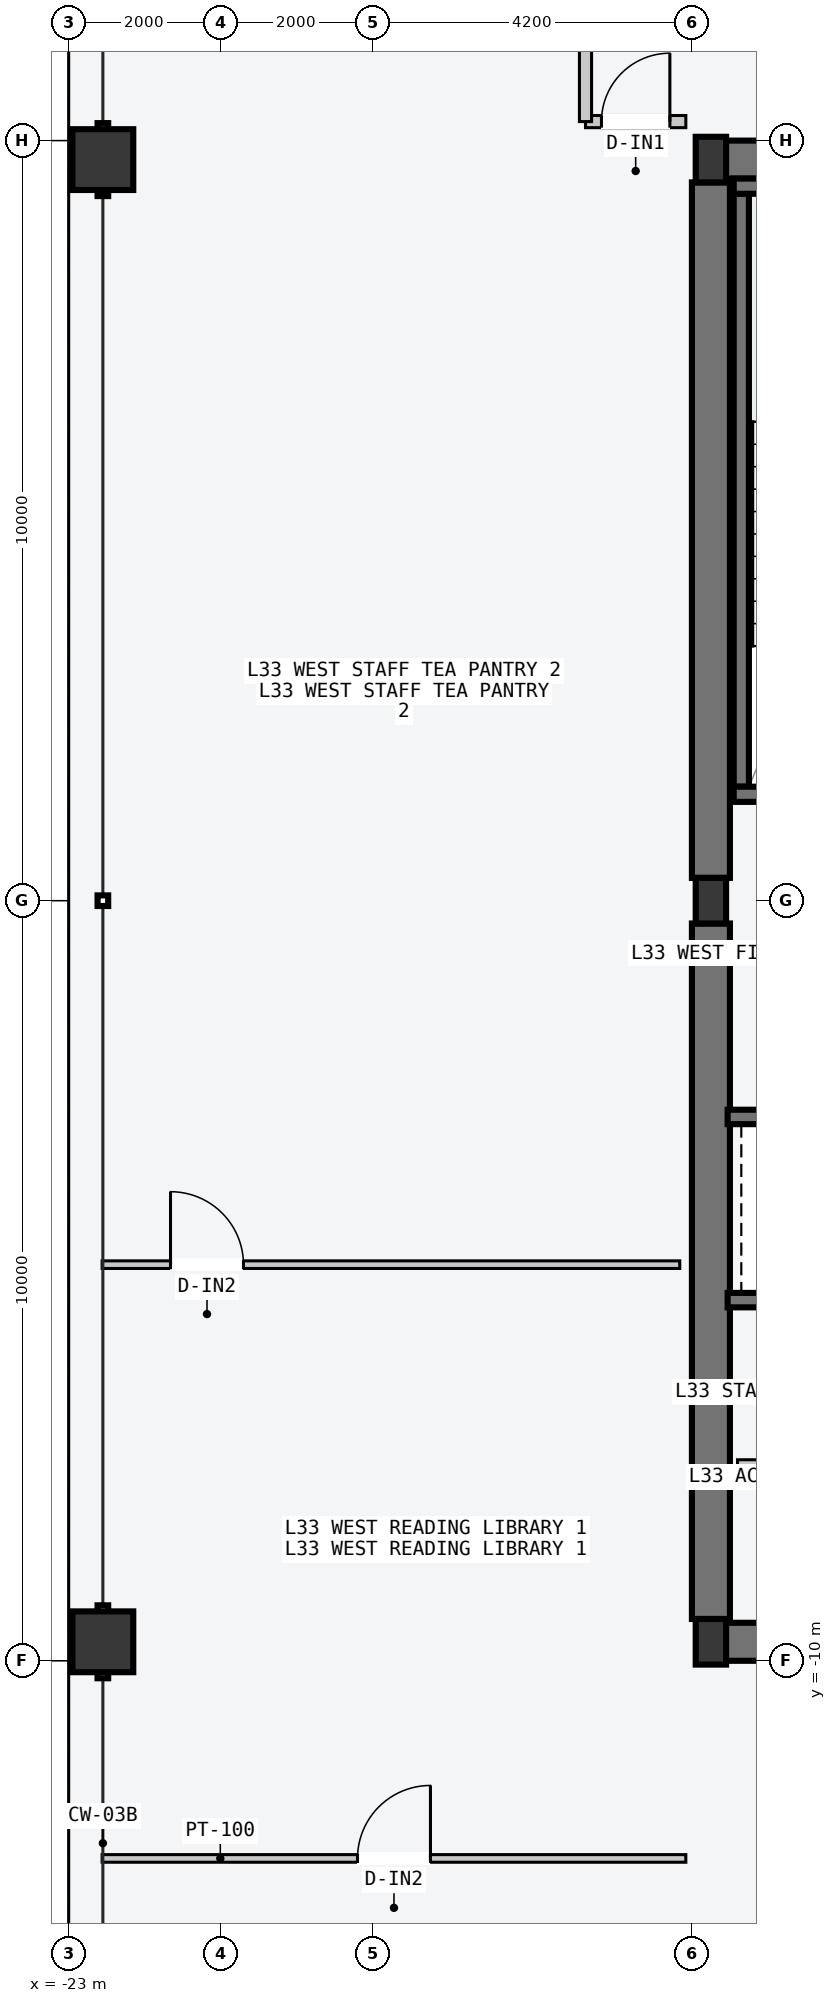
"""IFC4 building model, lengths in metres.
Left out: names, types, materials, properties, quantities, classifications, styles, units other than length and angle.
Written with IfcOpenShell. Run it as: python <this file> out.ifc"""

import sys

from ifc_helpers import new_model, si_unit, direction, frame, frame_2d, origin, origin_2d, place, context, subcontext, project, spatial, rectangle, hollow_rectangle, i_section, extrude, element, fill, save


model = new_model("IFC4")
c1 = context("Model", 3, precision=1e-05, world=origin(), true_north=direction((0.0, 1.0)))
c2 = subcontext(c1, "Body", "Model", "MODEL_VIEW")
j1 = project(units=[si_unit("LENGTHUNIT", "METRE"), si_unit("PLANEANGLEUNIT", "RADIAN")], contexts=[c1])
p1 = place(None, origin())
s1 = spatial("IfcSite", under=j1, at=p1, CompositionType="ELEMENT")
p2 = place(p1, origin())
s2 = spatial("IfcBuilding", under=s1, at=p2, CompositionType="ELEMENT")
p3 = place(p2, frame((0.0, 0.0, 127.8)))
s3 = spatial("IfcBuildingStorey", under=s2, at=p3, CompositionType="ELEMENT", Elevation=127.8)
for number, where, z_axis, x_axis in (
    (1, (-14.53, -9.75, -0.2), (0.0, 0.0, 1.0), (1.0, 0.0, 0.0)),
    (2, (-14.53, 9.75, -0.2), (0.0, 0.0, 1.0), (1.0, 0.0, 0.0)),
):
    element("IfcWall", number, at=place(p3, frame(where, z_axis=z_axis, x_axis=x_axis)), inside=s3, PredefinedType="SHEAR", context=c2, shape_type="SweptSolid", body=[
        extrude(rectangle(XDim=6.46, YDim=0.5, at=frame_2d((3.23, 0.0))), origin(), (0.0, 0.0, 1.0), 3.6),
    ])
for number, where, z_axis, x_axis in (
    (3, (-14.55, -9.45, -0.2), (0.0, 0.0, 1.0), (0.0, 1.0, 0.0)),
    (4, (-14.55, 0.3, -0.2), (0.0, 0.0, 1.0), (0.0, 1.0, 0.0)),
):
    element("IfcWall", number, at=place(p3, frame(where, z_axis=z_axis, x_axis=x_axis)), inside=s3, PredefinedType="SHEAR", context=c2, shape_type="SweptSolid", body=[
        extrude(rectangle(XDim=9.15, YDim=0.5, at=frame_2d((4.575, 0.0))), origin(), (0.0, 0.0, 1.0), 3.6),
    ])
p4 = place(p3, frame((-14.15, 1.5, -0.2), z_axis=(0.0, 0.0, 1.0), x_axis=(0.0, 1.0, 0.0)))
e5 = element("IfcWall", 5, at=p4, inside=s3, PredefinedType="SOLIDWALL", context=c2, shape_type="SweptSolid", body=[
    extrude(rectangle(XDim=7.8, YDim=0.2, at=frame_2d((3.9, 0.0))), origin(), (0.0, 0.0, 1.0), 3.6),
])
p5 = place(p3, frame((-14.25, 1.4, -0.2), z_axis=(0.0, 0.0, 1.0), x_axis=(1.0, 0.0, 0.0)))
e6 = element("IfcWall", 6, at=p5, inside=s3, PredefinedType="SOLIDWALL", context=c2, shape_type="SweptSolid", body=[
    extrude(rectangle(XDim=3.72, YDim=0.2, at=frame_2d((1.86, 0.0))), origin(), (0.0, 0.0, 1.0), 3.6),
])
p6 = place(p5, frame((1.5, 0.0, 0.2)))
e7 = element("IfcOpeningElement", 7, at=p6, cuts=e6, PredefinedType="OPENING", context=c2, shape_type="SweptSolid", body=[
    extrude(rectangle(XDim=1.12, YDim=2.18, at=frame_2d((0.56, 1.09))), frame((0.0, 0.11, 0.0), z_axis=(0.0, -1.0, 0.0), x_axis=(1.0, 0.0, 0.0)), (0.0, 0.0, 1.0), 0.22),
])
p7 = place(p3, frame((-14.25, 9.4, -0.2), z_axis=(0.0, 0.0, 1.0), x_axis=(1.0, 0.0, 0.0)))
e8 = element("IfcWall", 8, at=p7, inside=s3, PredefinedType="SOLIDWALL", context=c2, shape_type="SweptSolid", body=[
    extrude(rectangle(XDim=3.72, YDim=0.2, at=frame_2d((1.86, 0.0))), origin(), (0.0, 0.0, 1.0), 3.6),
])
for number, where, z_axis, x_axis in (
    (9, (-14.55, -9.75, 0.0), (0.0, 0.0, 1.0), (1.0, 0.0, 0.0)),
    (10, (-14.55, 0.0, 0.0), (0.0, 0.0, 1.0), (1.0, 0.0, 0.0)),
    (11, (-14.55, 9.75, 0.0), (0.0, 0.0, 1.0), (1.0, 0.0, 0.0)),
):
    element("IfcColumn", number, at=place(p3, frame(where, z_axis=z_axis, x_axis=x_axis)), inside=s3, PredefinedType="COLUMN", context=c2, shape_type="SweptSolid", body=[
        extrude(i_section(OverallWidth=0.4, OverallDepth=0.6, WebThickness=0.022, FlangeThickness=0.036, at=origin_2d()), origin(), (0.0, 0.0, 1.0), 3.6),
    ])
for number, where, z_axis, x_axis in (
    (12, (-22.55, -9.75, 0.0), (0.0, 0.0, 1.0), (0.0, 1.0, 0.0)),
    (13, (-22.55, 9.75, 0.0), (0.0, 0.0, 1.0), (0.0, 1.0, 0.0)),
):
    element("IfcColumn", number, at=place(p3, frame(where, z_axis=z_axis, x_axis=x_axis)), inside=s3, PredefinedType="COLUMN", context=c2, shape_type="SweptSolid", body=[
        extrude(hollow_rectangle(XDim=0.8, YDim=0.8, WallThickness=0.036, at=origin_2d()), origin(), (0.0, 0.0, 1.0), 3.6),
    ])
p8 = place(p3, frame((-14.33, -2.845, -0.2), z_axis=(0.0, 0.0, 1.0), x_axis=(1.0, 0.0, 0.0)))
e14 = element("IfcWall", 14, at=p8, inside=s3, PredefinedType="SOLIDWALL", context=c2, shape_type="SweptSolid", body=[
    extrude(rectangle(XDim=2.68, YDim=0.19, at=frame_2d((1.34, 0.0))), origin(), (0.0, 0.0, 1.0), 3.6),
])
p9 = place(p8, frame((0.83, 0.0, 0.2)))
e15 = element("IfcOpeningElement", 15, at=p9, cuts=e14, PredefinedType="OPENING", context=c2, shape_type="SweptSolid", body=[
    extrude(rectangle(XDim=1.2, YDim=2.2, at=frame_2d((0.6, 1.1))), frame((0.0, 0.105, 0.0), z_axis=(0.0, -1.0, 0.0), x_axis=(1.0, 0.0, 0.0)), (0.0, 0.0, 1.0), 0.21),
])
p10 = place(p3, frame((-14.33, -5.255, -0.2), z_axis=(0.0, 0.0, 1.0), x_axis=(1.0, 0.0, 0.0)))
e16 = element("IfcWall", 16, at=p10, inside=s3, PredefinedType="SOLIDWALL", context=c2, shape_type="SweptSolid", body=[
    extrude(rectangle(XDim=2.68, YDim=0.19, at=frame_2d((1.34, 0.0))), origin(), (0.0, 0.0, 1.0), 3.6),
])
p11 = place(p3, frame((-11.7, -7.425, 0.0), z_axis=(0.0, 0.0, 1.0), x_axis=(-1.0, 0.0, 0.0)))
e17 = element("IfcWall", 17, at=p11, inside=s3, PredefinedType="PARTITIONING", context=c2, shape_type="SweptSolid", body=[
    extrude(rectangle(XDim=2.5, YDim=0.14, at=frame_2d((1.25, 0.0))), origin(), (0.0, 0.0, 1.0), 3.4),
])
p12 = place(p3, frame((-22.56, -12.6, 0.0), z_axis=(0.0, 0.0, 1.0), x_axis=(1.0, 0.0, 0.0)))
e18 = element("IfcWall", 18, at=p12, inside=s3, PredefinedType="PARTITIONING", context=c2, shape_type="SweptSolid", body=[
    extrude(rectangle(XDim=7.68, YDim=0.1, at=frame_2d((3.84, 0.0))), origin(), (0.0, 0.0, 1.0), 3.4),
])
p13 = place(p12, frame((3.36, 0.0, 0.0)))
e19 = element("IfcOpeningElement", 19, at=p13, cuts=e18, PredefinedType="OPENING", context=c2, shape_type="SweptSolid", body=[
    extrude(rectangle(XDim=0.96, YDim=2.18, at=frame_2d((0.48, 1.09))), frame((0.0, 0.06, 0.0), z_axis=(0.0, -1.0, 0.0), x_axis=(1.0, 0.0, 0.0)), (0.0, 0.0, 1.0), 0.12),
])
p14 = place(p3, frame((-16.2, 10.25, 0.0), z_axis=(0.0, 0.0, 1.0), x_axis=(1.0, 0.0, 0.0)))
e20 = element("IfcWall", 20, at=p14, inside=s3, PredefinedType="PARTITIONING", context=c2, shape_type="SweptSolid", body=[
    extrude(rectangle(XDim=1.32, YDim=0.16, at=frame_2d((0.66, 0.0))), origin(), (0.0, 0.0, 1.0), 3.4),
])
p15 = place(p14, frame((0.21, 0.0, 0.0)))
e21 = element("IfcOpeningElement", 21, at=p15, cuts=e20, PredefinedType="OPENING", context=c2, shape_type="SweptSolid", body=[
    extrude(rectangle(XDim=0.9, YDim=2.15, at=frame_2d((0.45, 1.075))), frame((0.0, 0.09, 0.0), z_axis=(0.0, -1.0, 0.0), x_axis=(1.0, 0.0, 0.0)), (0.0, 0.0, 1.0), 0.18),
])
p16 = place(p3, frame((-16.2, 10.25, 0.0), z_axis=(0.0, 0.0, 1.0), x_axis=(0.0, 1.0, 0.0)))
e22 = element("IfcWall", 22, at=p16, inside=s3, PredefinedType="PARTITIONING", context=c2, shape_type="SweptSolid", body=[
    extrude(rectangle(XDim=1.95, YDim=0.16, at=frame_2d((0.975, 0.0))), origin(), (0.0, 0.0, 1.0), 3.4),
])
p17 = place(p3, frame((-22.56, -4.788, 0.0), z_axis=(0.0, 0.0, 1.0), x_axis=(1.0, 0.0, 0.0)))
e23 = element("IfcWall", 23, at=p17, inside=s3, PredefinedType="PARTITIONING", context=c2, shape_type="SweptSolid", body=[
    extrude(rectangle(XDim=7.6, YDim=0.1, at=frame_2d((3.8, 0.0))), origin(), (0.0, 0.0, 1.0), 3.4),
])
p18 = place(p17, frame((0.9, 0.0, 0.0)))
e24 = element("IfcOpeningElement", 24, at=p18, cuts=e23, PredefinedType="OPENING", context=c2, shape_type="SweptSolid", body=[
    extrude(rectangle(XDim=0.96, YDim=2.18, at=frame_2d((0.48, 1.09))), frame((0.0, 0.06, 0.0), z_axis=(0.0, -1.0, 0.0), x_axis=(1.0, 0.0, 0.0)), (0.0, 0.0, 1.0), 0.12),
])
p19 = place(p13, origin())
e25 = element("IfcDoor", 25, at=p19, inside=s3, OperationType="SINGLE_SWING_RIGHT", PredefinedType="DOOR", context=c2, shape_type="SweptSolid", body=[
    extrude(rectangle(XDim=0.96, YDim=2.18, at=frame_2d((0.48, 1.09))), frame((0.0, 0.025, 0.0), z_axis=(0.0, -1.0, 0.0), x_axis=(1.0, 0.0, 0.0)), (0.0, 0.0, 1.0), 0.05),
])
fill(e19, e25)
p20 = place(p15, origin())
e26 = element("IfcDoor", 26, at=p20, inside=s3, OperationType="SINGLE_SWING_RIGHT", PredefinedType="DOOR", context=c2, shape_type="SweptSolid", body=[
    extrude(rectangle(XDim=0.9, YDim=2.15, at=frame_2d((0.45, 1.075))), frame((0.0, 0.025, 0.0), z_axis=(0.0, -1.0, 0.0), x_axis=(1.0, 0.0, 0.0)), (0.0, 0.0, 1.0), 0.05),
])
fill(e21, e26)
p21 = place(p18, origin())
e27 = element("IfcDoor", 27, at=p21, inside=s3, OperationType="SINGLE_SWING_LEFT", PredefinedType="DOOR", context=c2, shape_type="SweptSolid", body=[
    extrude(rectangle(XDim=0.96, YDim=2.18, at=frame_2d((0.48, 1.09))), frame((0.0, 0.025, 0.0), z_axis=(0.0, -1.0, 0.0), x_axis=(1.0, 0.0, 0.0)), (0.0, 0.0, 1.0), 0.05),
])
fill(e24, e27)
save(model, sys.argv[1])
